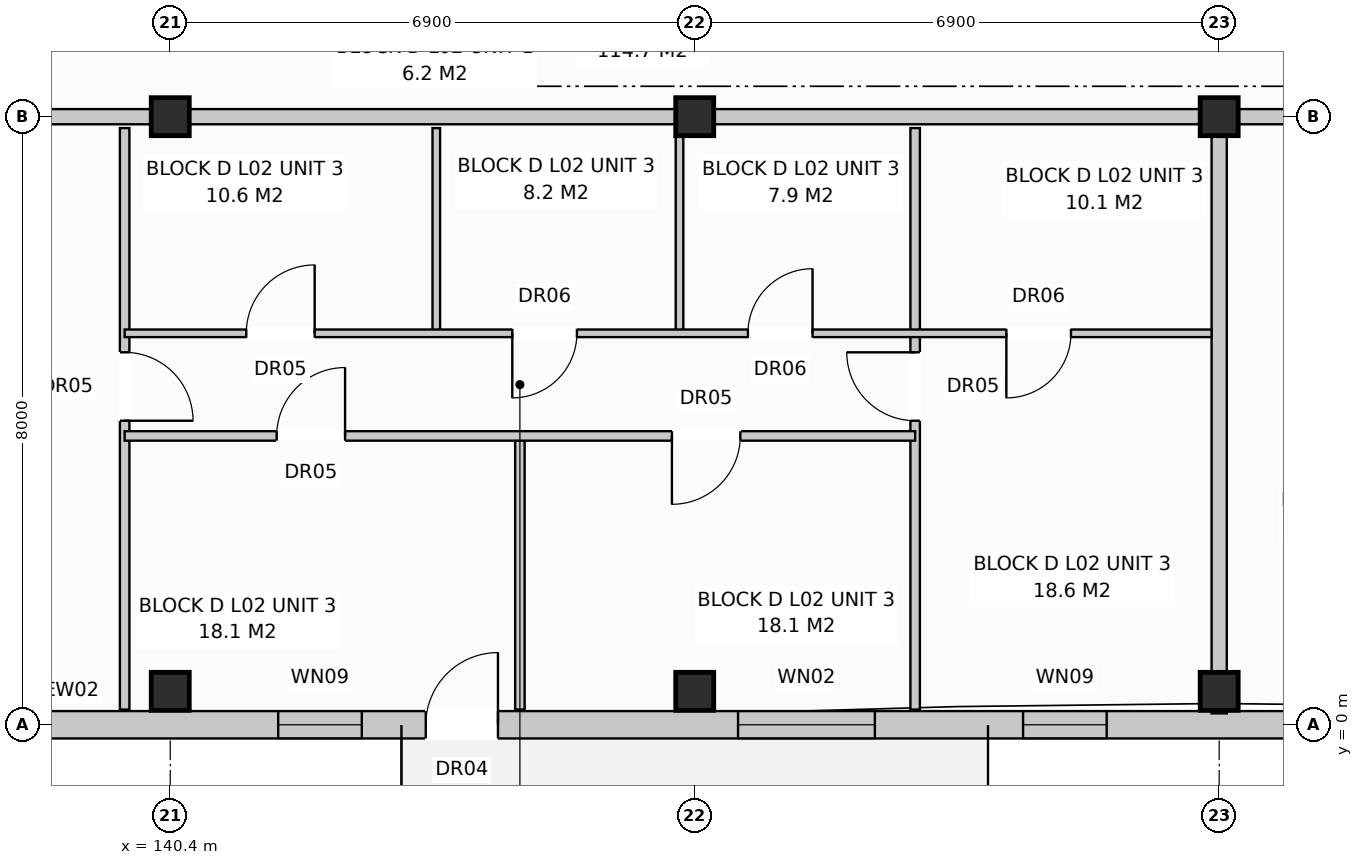
"""IFC4 building model, lengths in metres.
Left out: names, types, materials, properties, quantities, classifications, styles, units other than length and angle.
Written with IfcOpenShell. Run it as: python <this file> out.ifc"""

import sys

from ifc_helpers import new_model, si_unit, direction, frame, frame_2d, origin, origin_with_axes, origin_2d, place, context, subcontext, project, spatial, rectangle, extrude, element, fill, save


model = new_model("IFC4")
c1 = context("Model", 3, precision=1e-05, world=origin(), true_north=direction((0.0, 1.0)))
c2 = subcontext(c1, "Body", "Model", "MODEL_VIEW")
j1 = project(units=[si_unit("LENGTHUNIT", "METRE"), si_unit("PLANEANGLEUNIT", "RADIAN")], contexts=[c1])
p1 = place(None, origin())
s1 = spatial("IfcSite", under=j1, at=p1, CompositionType="ELEMENT")
p2 = place(p1, origin())
s2 = spatial("IfcBuilding", under=s1, at=p2, CompositionType="ELEMENT")
p3 = place(p2, frame((0.0, 0.0, 8.0)))
s3 = spatial("IfcBuildingStorey", under=s2, at=p3, CompositionType="ELEMENT", Elevation=8.0)
for number, where, z_axis, x_axis in (
    (1, (140.4, 0.44, 0.0), (0.0, 0.0, 1.0), (1.0, 0.0, 0.0)),
    (2, (140.4, 8.0, 0.0), (0.0, 0.0, 1.0), (1.0, 0.0, 0.0)),
    (3, (147.3, 0.44, 0.0), (0.0, 0.0, 1.0), (1.0, 0.0, 0.0)),
    (4, (147.3, 8.0, 0.0), (0.0, 0.0, 1.0), (1.0, 0.0, 0.0)),
    (5, (154.2, 0.44, 0.0), (0.0, 0.0, 1.0), (1.0, 0.0, 0.0)),
    (6, (154.2, 8.0, 0.0), (0.0, 0.0, 1.0), (1.0, 0.0, 0.0)),
):
    element("IfcColumn", number, at=place(p3, frame(where, z_axis=z_axis, x_axis=x_axis)), inside=s3, PredefinedType="COLUMN", context=c2, shape_type="SweptSolid", body=[
        extrude(rectangle(XDim=0.5, YDim=0.5, at=origin_2d()), origin(), (0.0, 0.0, 1.0), 3.2),
    ])
p4 = place(p3, frame((112.97, 0.0, 0.0), z_axis=(0.0, 0.0, 1.0), x_axis=(1.0, 0.0, 0.0)))
e7 = element("IfcWall", 7, at=p4, inside=s3, PredefinedType="STANDARD", context=c2, shape_type="SweptSolid", body=[
    extrude(rectangle(XDim=54.86, YDim=0.36, at=frame_2d((27.43, 0.0))), origin(), (0.0, 0.0, 1.0), 2.94),
])
p5 = place(p4, frame((2.788, 0.0, 0.0)))
e8 = element("IfcOpeningElement", 8, at=p5, cuts=e7, PredefinedType="OPENING", context=c2, shape_type="SweptSolid", body=[
    extrude(rectangle(XDim=0.95, YDim=2.1, at=frame_2d((0.475, 1.05))), frame((0.0, 0.192, 0.0), z_axis=(0.0, -1.0, 0.0), x_axis=(1.0, 0.0, 0.0)), (0.0, 0.0, 1.0), 0.384),
])
p6 = place(p4, frame((18.9, 0.0, 0.0)))
e9 = element("IfcOpeningElement", 9, at=p6, cuts=e7, PredefinedType="OPENING", context=c2, shape_type="SweptSolid", body=[
    extrude(rectangle(XDim=0.95, YDim=2.1, at=frame_2d((0.475, 1.05))), frame((0.0, 0.192, 0.0), z_axis=(0.0, -1.0, 0.0), x_axis=(1.0, 0.0, 0.0)), (0.0, 0.0, 1.0), 0.384),
])
p7 = place(p4, frame((30.792, 0.0, 0.0)))
e10 = element("IfcOpeningElement", 10, at=p7, cuts=e7, PredefinedType="OPENING", context=c2, shape_type="SweptSolid", body=[
    extrude(rectangle(XDim=0.95, YDim=2.1, at=frame_2d((0.475, 1.05))), frame((0.0, 0.192, 0.0), z_axis=(0.0, -1.0, 0.0), x_axis=(1.0, 0.0, 0.0)), (0.0, 0.0, 1.0), 0.384),
])
p8 = place(p4, frame((45.191, 0.0, 0.0)))
e11 = element("IfcOpeningElement", 11, at=p8, cuts=e7, PredefinedType="OPENING", context=c2, shape_type="SweptSolid", body=[
    extrude(rectangle(XDim=0.95, YDim=2.1, at=frame_2d((0.475, 1.05))), frame((0.0, 0.192, 0.0), z_axis=(0.0, -1.0, 0.0), x_axis=(1.0, 0.0, 0.0)), (0.0, 0.0, 1.0), 0.384),
])
p9 = place(p4, frame((0.645, 0.0, 0.8)))
e12 = element("IfcOpeningElement", 12, at=p9, cuts=e7, PredefinedType="OPENING", context=c2, shape_type="SweptSolid", body=[
    extrude(rectangle(XDim=1.8, YDim=1.7, at=frame_2d((0.9, 0.85))), frame((0.0, 0.192, 0.0), z_axis=(0.0, -1.0, 0.0), x_axis=(1.0, 0.0, 0.0)), (0.0, 0.0, 1.0), 0.384),
])
p10 = place(p4, frame((4.35, 0.0, 0.72)))
e13 = element("IfcOpeningElement", 13, at=p10, cuts=e7, PredefinedType="OPENING", context=c2, shape_type="SweptSolid", body=[
    extrude(rectangle(XDim=1.9, YDim=1.85, at=frame_2d((0.95, 0.925))), frame((0.0, 0.192, 0.0), z_axis=(0.0, -1.0, 0.0), x_axis=(1.0, 0.0, 0.0)), (0.0, 0.0, 1.0), 0.384),
])
p11 = place(p4, frame((10.45, 0.0, 0.72)))
e14 = element("IfcOpeningElement", 14, at=p11, cuts=e7, PredefinedType="OPENING", context=c2, shape_type="SweptSolid", body=[
    extrude(rectangle(XDim=1.1, YDim=1.5, at=frame_2d((0.55, 0.75))), frame((0.0, 0.192, 0.0), z_axis=(0.0, -1.0, 0.0), x_axis=(1.0, 0.0, 0.0)), (0.0, 0.0, 1.0), 0.384),
])
p12 = place(p4, frame((15.05, 0.0, 0.72)))
e15 = element("IfcOpeningElement", 15, at=p12, cuts=e7, PredefinedType="OPENING", context=c2, shape_type="SweptSolid", body=[
    extrude(rectangle(XDim=1.1, YDim=1.5, at=frame_2d((0.55, 0.75))), frame((0.0, 0.192, 0.0), z_axis=(0.0, -1.0, 0.0), x_axis=(1.0, 0.0, 0.0)), (0.0, 0.0, 1.0), 0.384),
])
p13 = place(p4, frame((22.75, 0.0, 0.8)))
e16 = element("IfcOpeningElement", 16, at=p13, cuts=e7, PredefinedType="OPENING", context=c2, shape_type="SweptSolid", body=[
    extrude(rectangle(XDim=1.9, YDim=1.85, at=frame_2d((0.95, 0.925))), frame((0.0, 0.192, 0.0), z_axis=(0.0, -1.0, 0.0), x_axis=(1.0, 0.0, 0.0)), (0.0, 0.0, 1.0), 0.384),
])
p14 = place(p4, frame((28.85, 0.0, 0.72)))
e17 = element("IfcOpeningElement", 17, at=p14, cuts=e7, PredefinedType="OPENING", context=c2, shape_type="SweptSolid", body=[
    extrude(rectangle(XDim=1.1, YDim=1.5, at=frame_2d((0.55, 0.75))), frame((0.0, 0.192, 0.0), z_axis=(0.0, -1.0, 0.0), x_axis=(1.0, 0.0, 0.0)), (0.0, 0.0, 1.0), 0.384),
])
p15 = place(p4, frame((34.9, 0.0, 0.8)))
e18 = element("IfcOpeningElement", 18, at=p15, cuts=e7, PredefinedType="OPENING", context=c2, shape_type="SweptSolid", body=[
    extrude(rectangle(XDim=1.8, YDim=1.7, at=frame_2d((0.9, 0.85))), frame((0.0, 0.192, 0.0), z_axis=(0.0, -1.0, 0.0), x_axis=(1.0, 0.0, 0.0)), (0.0, 0.0, 1.0), 0.384),
])
p16 = place(p4, frame((38.65, 0.0, 0.72)))
e19 = element("IfcOpeningElement", 19, at=p16, cuts=e7, PredefinedType="OPENING", context=c2, shape_type="SweptSolid", body=[
    extrude(rectangle(XDim=1.1, YDim=1.5, at=frame_2d((0.55, 0.75))), frame((0.0, 0.192, 0.0), z_axis=(0.0, -1.0, 0.0), x_axis=(1.0, 0.0, 0.0)), (0.0, 0.0, 1.0), 0.384),
])
p17 = place(p4, frame((43.35, 0.0, 0.72)))
e20 = element("IfcOpeningElement", 20, at=p17, cuts=e7, PredefinedType="OPENING", context=c2, shape_type="SweptSolid", body=[
    extrude(rectangle(XDim=1.1, YDim=1.5, at=frame_2d((0.55, 0.75))), frame((0.0, 0.192, 0.0), z_axis=(0.0, -1.0, 0.0), x_axis=(1.0, 0.0, 0.0)), (0.0, 0.0, 1.0), 0.384),
])
p18 = place(p4, frame((48.7, 0.0, 0.8)))
e21 = element("IfcOpeningElement", 21, at=p18, cuts=e7, PredefinedType="OPENING", context=c2, shape_type="SweptSolid", body=[
    extrude(rectangle(XDim=1.8, YDim=1.7, at=frame_2d((0.9, 0.85))), frame((0.0, 0.192, 0.0), z_axis=(0.0, -1.0, 0.0), x_axis=(1.0, 0.0, 0.0)), (0.0, 0.0, 1.0), 0.384),
])
p19 = place(p4, frame((52.25, 0.0, 0.72)))
e22 = element("IfcOpeningElement", 22, at=p19, cuts=e7, PredefinedType="OPENING", context=c2, shape_type="SweptSolid", body=[
    extrude(rectangle(XDim=1.1, YDim=1.5, at=frame_2d((0.55, 0.75))), frame((0.0, 0.192, 0.0), z_axis=(0.0, -1.0, 0.0), x_axis=(1.0, 0.0, 0.0)), (0.0, 0.0, 1.0), 0.384),
])
p20 = place(p3, frame((154.2, 7.85, 0.0), z_axis=(0.0, 0.0, 1.0), x_axis=(0.0, -1.0, 0.0)))
e23 = element("IfcWall", 23, at=p20, inside=s3, PredefinedType="PARTITIONING", context=c2, shape_type="SweptSolid", body=[
    extrude(rectangle(XDim=7.7, YDim=0.2, at=frame_2d((3.85, 0.0))), origin(), (0.0, 0.0, 1.0), 2.94),
])
p21 = place(p3, frame((133.5, 8.0, 0.0), z_axis=(0.0, 0.0, 1.0), x_axis=(1.0, 0.0, 0.0)))
e24 = element("IfcWall", 24, at=p21, inside=s3, PredefinedType="PARTITIONING", context=c2, shape_type="SweptSolid", body=[
    extrude(rectangle(XDim=20.7, YDim=0.2, at=frame_2d((10.35, 0.0))), origin(), (0.0, 0.0, 1.0), 2.38),
])
p22 = place(p21, frame((2.4, 0.0, 0.0)))
e25 = element("IfcOpeningElement", 25, at=p22, cuts=e24, PredefinedType="OPENING", context=c2, shape_type="SweptSolid", body=[
    extrude(rectangle(XDim=0.95, YDim=2.15, at=frame_2d((0.475, 1.075))), frame((0.0, 0.112, 0.0), z_axis=(0.0, -1.0, 0.0), x_axis=(1.0, 0.0, 0.0)), (0.0, 0.0, 1.0), 0.224),
])
p23 = place(p3, frame((139.8, 7.85, 0.0), z_axis=(0.0, 0.0, 1.0), x_axis=(0.0, -1.0, 0.0)))
e26 = element("IfcWall", 26, at=p23, inside=s3, PredefinedType="PARTITIONING", context=c2, shape_type="SweptSolid", body=[
    extrude(rectangle(XDim=7.65, YDim=0.125, at=frame_2d((3.825, 0.0))), origin(), (0.0, 0.0, 1.0), 2.94),
])
p24 = place(p23, frame((2.95, 0.0, 0.0)))
e27 = element("IfcOpeningElement", 27, at=p24, cuts=e26, PredefinedType="OPENING", context=c2, shape_type="SweptSolid", body=[
    extrude(rectangle(XDim=0.9, YDim=2.1, at=frame_2d((0.45, 1.05))), frame((0.0, 0.074, 0.0), z_axis=(0.0, -1.0, 0.0), x_axis=(1.0, 0.0, 0.0)), (0.0, 0.0, 1.0), 0.149),
])
for number, where, z_axis, x_axis in (
    (28, (143.9, 7.85, 0.0), (0.0, 0.0, 1.0), (0.0, -1.0, 0.0)),
    (29, (147.1, 7.85, 0.0), (0.0, 0.0, 1.0), (0.0, -1.0, 0.0)),
):
    element("IfcWall", number, at=place(p3, frame(where, z_axis=z_axis, x_axis=x_axis)), inside=s3, PredefinedType="PARTITIONING", context=c2, shape_type="SweptSolid", body=[
        extrude(rectangle(XDim=2.7, YDim=0.1, at=frame_2d((1.35, 0.0))), origin(), (0.0, 0.0, 1.0), 2.94),
    ])
p25 = place(p3, frame((145.0, 3.8, 0.0), z_axis=(0.0, 0.0, 1.0), x_axis=(0.0, -1.0, 0.0)))
e30 = element("IfcWall", 30, at=p25, inside=s3, PredefinedType="PARTITIONING", context=c2, shape_type="SweptSolid", body=[
    extrude(rectangle(XDim=3.6, YDim=0.125, at=frame_2d((1.8, 0.0))), origin(), (0.0, 0.0, 1.0), 2.94),
])
p26 = place(p3, frame((150.2, 7.85, 0.0), z_axis=(0.0, 0.0, 1.0), x_axis=(0.0, -1.0, 0.0)))
e31 = element("IfcWall", 31, at=p26, inside=s3, PredefinedType="PARTITIONING", context=c2, shape_type="SweptSolid", body=[
    extrude(rectangle(XDim=7.65, YDim=0.125, at=frame_2d((3.825, 0.0))), origin(), (0.0, 0.0, 1.0), 2.94),
])
p27 = place(p26, frame((2.95, 0.0, 0.0)))
e32 = element("IfcOpeningElement", 32, at=p27, cuts=e31, PredefinedType="OPENING", context=c2, shape_type="SweptSolid", body=[
    extrude(rectangle(XDim=0.9, YDim=2.1, at=frame_2d((0.45, 1.05))), frame((0.0, 0.074, 0.0), z_axis=(0.0, -1.0, 0.0), x_axis=(1.0, 0.0, 0.0)), (0.0, 0.0, 1.0), 0.149),
])
p28 = place(p3, frame((139.8, 5.15, 0.0), z_axis=(0.0, 0.0, 1.0), x_axis=(1.0, 0.0, 0.0)))
e33 = element("IfcWall", 33, at=p28, inside=s3, PredefinedType="PARTITIONING", context=c2, shape_type="SweptSolid", body=[
    extrude(rectangle(XDim=14.3, YDim=0.1, at=frame_2d((7.15, 0.0))), origin(), (0.0, 0.0, 1.0), 2.94),
])
p29 = place(p28, frame((1.6, 0.0, 0.0)))
e34 = element("IfcOpeningElement", 34, at=p29, cuts=e33, PredefinedType="OPENING", context=c2, shape_type="SweptSolid", body=[
    extrude(rectangle(XDim=0.9, YDim=2.1, at=frame_2d((0.45, 1.05))), frame((0.0, 0.062, 0.0), z_axis=(0.0, -1.0, 0.0), x_axis=(1.0, 0.0, 0.0)), (0.0, 0.0, 1.0), 0.124),
])
p30 = place(p28, frame((5.1, 0.0, 0.0)))
e35 = element("IfcOpeningElement", 35, at=p30, cuts=e33, PredefinedType="OPENING", context=c2, shape_type="SweptSolid", body=[
    extrude(rectangle(XDim=0.85, YDim=2.05, at=frame_2d((0.425, 1.025))), frame((0.0, 0.062, 0.0), z_axis=(0.0, -1.0, 0.0), x_axis=(1.0, 0.0, 0.0)), (0.0, 0.0, 1.0), 0.124),
])
p31 = place(p28, frame((8.2, 0.0, 0.0)))
e36 = element("IfcOpeningElement", 36, at=p31, cuts=e33, PredefinedType="OPENING", context=c2, shape_type="SweptSolid", body=[
    extrude(rectangle(XDim=0.85, YDim=2.05, at=frame_2d((0.425, 1.025))), frame((0.0, 0.062, 0.0), z_axis=(0.0, -1.0, 0.0), x_axis=(1.0, 0.0, 0.0)), (0.0, 0.0, 1.0), 0.124),
])
p32 = place(p28, frame((11.6, 0.0, 0.0)))
e37 = element("IfcOpeningElement", 37, at=p32, cuts=e33, PredefinedType="OPENING", context=c2, shape_type="SweptSolid", body=[
    extrude(rectangle(XDim=0.85, YDim=2.05, at=frame_2d((0.425, 1.025))), frame((0.0, 0.062, 0.0), z_axis=(0.0, -1.0, 0.0), x_axis=(1.0, 0.0, 0.0)), (0.0, 0.0, 1.0), 0.124),
])
p33 = place(p3, frame((139.8, 3.8, 0.0), z_axis=(0.0, 0.0, 1.0), x_axis=(1.0, 0.0, 0.0)))
e38 = element("IfcWall", 38, at=p33, inside=s3, PredefinedType="PARTITIONING", context=c2, shape_type="SweptSolid", body=[
    extrude(rectangle(XDim=10.4, YDim=0.125, at=frame_2d((5.2, 0.0))), origin(), (0.0, 0.0, 1.0), 2.94),
])
p34 = place(p33, frame((2.0, 0.0, 0.0)))
e39 = element("IfcOpeningElement", 39, at=p34, cuts=e38, PredefinedType="OPENING", context=c2, shape_type="SweptSolid", body=[
    extrude(rectangle(XDim=0.9, YDim=2.1, at=frame_2d((0.45, 1.05))), frame((0.0, 0.074, 0.0), z_axis=(0.0, -1.0, 0.0), x_axis=(1.0, 0.0, 0.0)), (0.0, 0.0, 1.0), 0.149),
])
p35 = place(p33, frame((7.2, 0.0, 0.0)))
e40 = element("IfcOpeningElement", 40, at=p35, cuts=e38, PredefinedType="OPENING", context=c2, shape_type="SweptSolid", body=[
    extrude(rectangle(XDim=0.9, YDim=2.1, at=frame_2d((0.45, 1.05))), frame((0.0, 0.074, 0.0), z_axis=(0.0, -1.0, 0.0), x_axis=(1.0, 0.0, 0.0)), (0.0, 0.0, 1.0), 0.149),
])
p36 = place(p3, frame((154.2, 8.0, 0.0), z_axis=(0.0, 0.0, 1.0), x_axis=(1.0, 0.0, 0.0)))
e41 = element("IfcWall", 41, at=p36, inside=s3, PredefinedType="PARTITIONING", context=c2, shape_type="SweptSolid", body=[
    extrude(rectangle(XDim=13.8, YDim=0.2, at=frame_2d((6.9, 0.0))), origin(), (0.0, 0.0, 1.0), 2.38),
])
p37 = place(p36, frame((2.4, 0.0, 0.0)))
e42 = element("IfcOpeningElement", 42, at=p37, cuts=e41, PredefinedType="OPENING", context=c2, shape_type="SweptSolid", body=[
    extrude(rectangle(XDim=0.95, YDim=2.15, at=frame_2d((0.475, 1.075))), frame((0.0, 0.112, 0.0), z_axis=(0.0, -1.0, 0.0), x_axis=(1.0, 0.0, 0.0)), (0.0, 0.0, 1.0), 0.224),
])
p38 = place(p7, origin_with_axes())
e43 = element("IfcDoor", 43, at=p38, inside=s3, OperationType="SINGLE_SWING_RIGHT", PredefinedType="DOOR", context=c2, shape_type="SweptSolid", body=[
    extrude(rectangle(XDim=0.95, YDim=2.1, at=frame_2d((0.475, 1.05))), frame((0.0, 0.025, 0.0), z_axis=(0.0, -1.0, 0.0), x_axis=(1.0, 0.0, 0.0)), (0.0, 0.0, 1.0), 0.05),
])
fill(e10, e43)
p39 = place(p14, origin_with_axes())
e44 = element("IfcWindow", 44, at=p39, inside=s3, PartitioningType="SINGLE_PANEL", PredefinedType="WINDOW", context=c2, shape_type="SweptSolid", body=[
    extrude(rectangle(XDim=1.1, YDim=1.5, at=frame_2d((0.55, 0.75))), frame((0.0, 0.03, 0.0), z_axis=(0.0, -1.0, 0.0), x_axis=(1.0, 0.0, 0.0)), (0.0, 0.0, 1.0), 0.06),
])
fill(e17, e44)
p40 = place(p15, origin_with_axes())
e45 = element("IfcWindow", 45, at=p40, inside=s3, PartitioningType="SINGLE_PANEL", PredefinedType="WINDOW", context=c2, shape_type="SweptSolid", body=[
    extrude(rectangle(XDim=1.8, YDim=1.7, at=frame_2d((0.9, 0.85))), frame((0.0, 0.03, 0.0), z_axis=(0.0, -1.0, 0.0), x_axis=(1.0, 0.0, 0.0)), (0.0, 0.0, 1.0), 0.06),
])
fill(e18, e45)
p41 = place(p16, origin_with_axes())
e46 = element("IfcWindow", 46, at=p41, inside=s3, PartitioningType="SINGLE_PANEL", PredefinedType="WINDOW", context=c2, shape_type="SweptSolid", body=[
    extrude(rectangle(XDim=1.1, YDim=1.5, at=frame_2d((0.55, 0.75))), frame((0.0, 0.03, 0.0), z_axis=(0.0, -1.0, 0.0), x_axis=(1.0, 0.0, 0.0)), (0.0, 0.0, 1.0), 0.06),
])
fill(e19, e46)
p42 = place(p24, origin_with_axes())
e47 = element("IfcDoor", 47, at=p42, inside=s3, OperationType="SINGLE_SWING_RIGHT", PredefinedType="DOOR", context=c2, shape_type="SweptSolid", body=[
    extrude(rectangle(XDim=0.9, YDim=2.1, at=frame_2d((0.45, 1.05))), frame((0.0, 0.025, 0.0), z_axis=(0.0, -1.0, 0.0), x_axis=(1.0, 0.0, 0.0)), (0.0, 0.0, 1.0), 0.05),
])
fill(e27, e47)
p43 = place(p27, frame((0.9, 0.0, 0.0), z_axis=(0.0, 0.0, 1.0), x_axis=(-1.0, 0.0, 0.0)))
e48 = element("IfcDoor", 48, at=p43, inside=s3, OperationType="SINGLE_SWING_LEFT", PredefinedType="DOOR", context=c2, shape_type="SweptSolid", body=[
    extrude(rectangle(XDim=0.9, YDim=2.1, at=frame_2d((0.45, 1.05))), frame((0.0, 0.025, 0.0), z_axis=(0.0, -1.0, 0.0), x_axis=(1.0, 0.0, 0.0)), (0.0, 0.0, 1.0), 0.05),
])
fill(e32, e48)
p44 = place(p29, origin_with_axes())
e49 = element("IfcDoor", 49, at=p44, inside=s3, OperationType="SINGLE_SWING_RIGHT", PredefinedType="DOOR", context=c2, shape_type="SweptSolid", body=[
    extrude(rectangle(XDim=0.9, YDim=2.1, at=frame_2d((0.45, 1.05))), frame((0.0, 0.025, 0.0), z_axis=(0.0, -1.0, 0.0), x_axis=(1.0, 0.0, 0.0)), (0.0, 0.0, 1.0), 0.05),
])
fill(e34, e49)
p45 = place(p30, frame((0.85, 0.0, 0.0), z_axis=(0.0, 0.0, 1.0), x_axis=(-1.0, 0.0, 0.0)))
e50 = element("IfcDoor", 50, at=p45, inside=s3, OperationType="SINGLE_SWING_LEFT", PredefinedType="DOOR", context=c2, shape_type="SweptSolid", body=[
    extrude(rectangle(XDim=0.85, YDim=2.05, at=frame_2d((0.425, 1.025))), frame((0.0, 0.025, 0.0), z_axis=(0.0, -1.0, 0.0), x_axis=(1.0, 0.0, 0.0)), (0.0, 0.0, 1.0), 0.05),
])
fill(e35, e50)
p46 = place(p31, origin_with_axes())
e51 = element("IfcDoor", 51, at=p46, inside=s3, OperationType="SINGLE_SWING_RIGHT", PredefinedType="DOOR", context=c2, shape_type="SweptSolid", body=[
    extrude(rectangle(XDim=0.85, YDim=2.05, at=frame_2d((0.425, 1.025))), frame((0.0, 0.025, 0.0), z_axis=(0.0, -1.0, 0.0), x_axis=(1.0, 0.0, 0.0)), (0.0, 0.0, 1.0), 0.05),
])
fill(e36, e51)
p47 = place(p32, frame((0.85, 0.0, 0.0), z_axis=(0.0, 0.0, 1.0), x_axis=(-1.0, 0.0, 0.0)))
e52 = element("IfcDoor", 52, at=p47, inside=s3, OperationType="SINGLE_SWING_LEFT", PredefinedType="DOOR", context=c2, shape_type="SweptSolid", body=[
    extrude(rectangle(XDim=0.85, YDim=2.05, at=frame_2d((0.425, 1.025))), frame((0.0, 0.025, 0.0), z_axis=(0.0, -1.0, 0.0), x_axis=(1.0, 0.0, 0.0)), (0.0, 0.0, 1.0), 0.05),
])
fill(e37, e52)
p48 = place(p34, origin_with_axes())
e53 = element("IfcDoor", 53, at=p48, inside=s3, OperationType="SINGLE_SWING_RIGHT", PredefinedType="DOOR", context=c2, shape_type="SweptSolid", body=[
    extrude(rectangle(XDim=0.9, YDim=2.1, at=frame_2d((0.45, 1.05))), frame((0.0, 0.025, 0.0), z_axis=(0.0, -1.0, 0.0), x_axis=(1.0, 0.0, 0.0)), (0.0, 0.0, 1.0), 0.05),
])
fill(e39, e53)
p49 = place(p35, frame((0.9, 0.0, 0.0), z_axis=(0.0, 0.0, 1.0), x_axis=(-1.0, 0.0, 0.0)))
e54 = element("IfcDoor", 54, at=p49, inside=s3, OperationType="SINGLE_SWING_LEFT", PredefinedType="DOOR", context=c2, shape_type="SweptSolid", body=[
    extrude(rectangle(XDim=0.9, YDim=2.1, at=frame_2d((0.45, 1.05))), frame((0.0, 0.025, 0.0), z_axis=(0.0, -1.0, 0.0), x_axis=(1.0, 0.0, 0.0)), (0.0, 0.0, 1.0), 0.05),
])
fill(e40, e54)
save(model, sys.argv[1])
